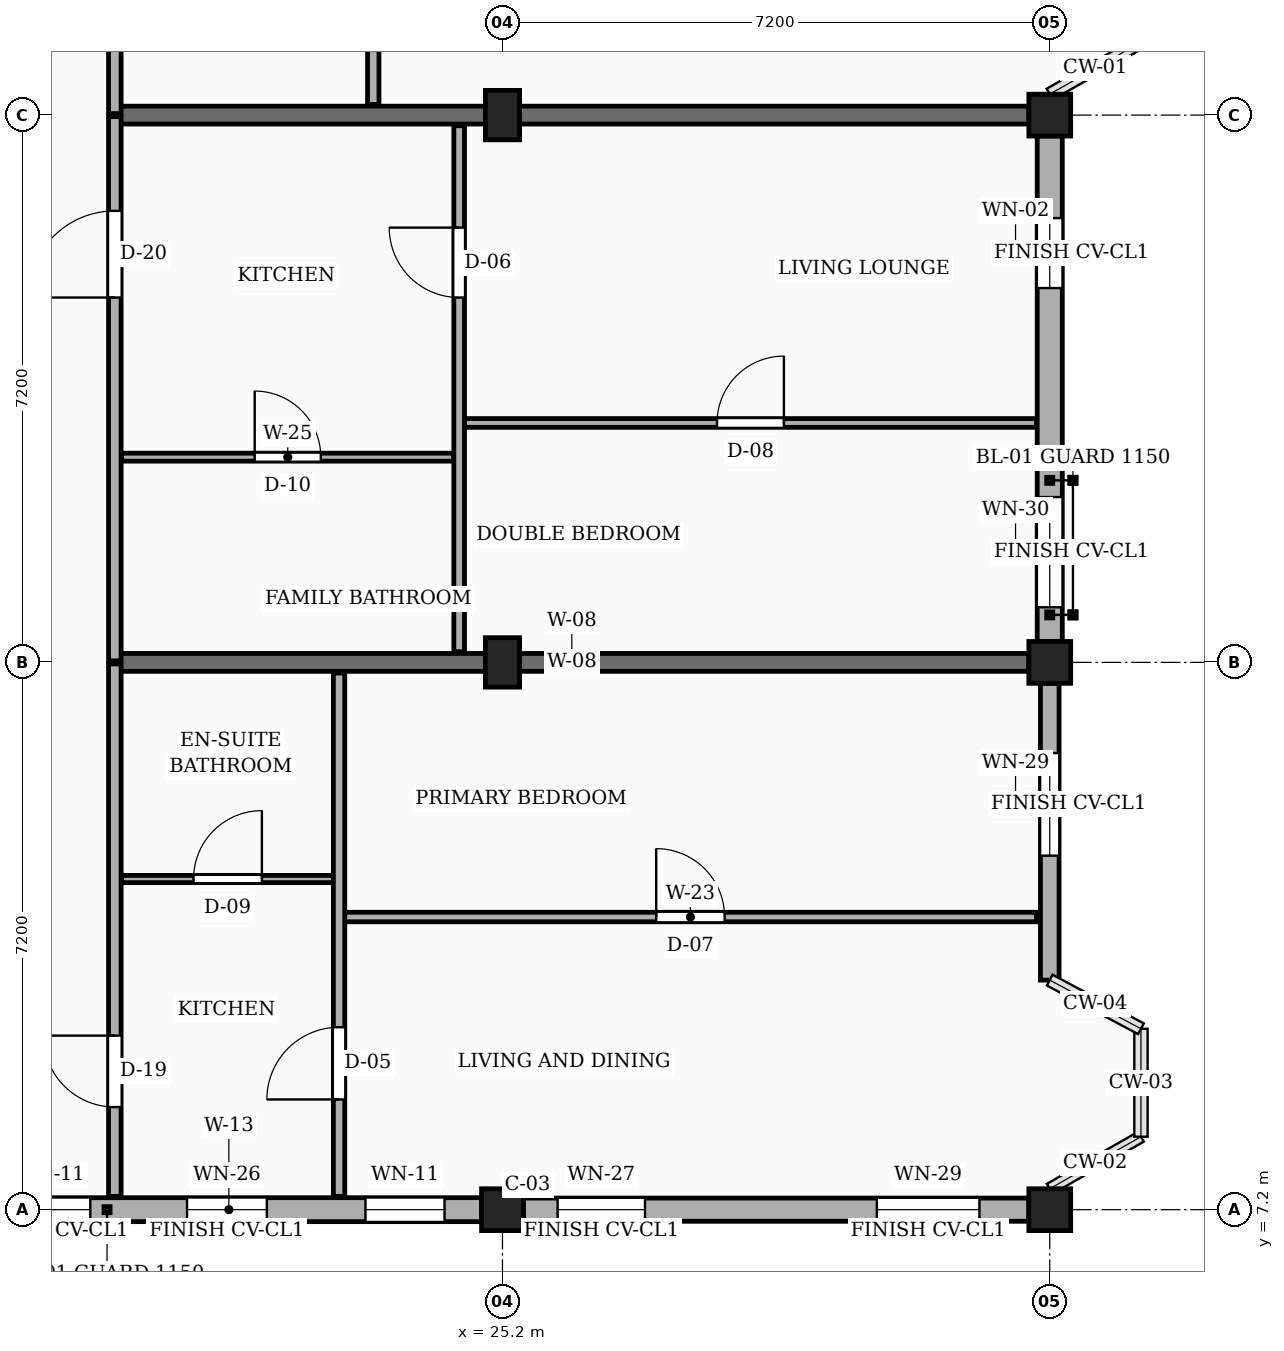
"""IFC4 building model, lengths in metres.
Left out: names, types, materials, properties, quantities, classifications, styles, units other than length and angle.
Written with IfcOpenShell. Run it as: python <this file> out.ifc"""

import sys

from ifc_helpers import new_model, si_unit, direction, frame, frame_2d, origin, origin_2d, place, context, subcontext, project, spatial, rectangle, extrude, element, fill, save


model = new_model("IFC4")
c1 = context("Model", 3, precision=1e-05, world=origin(), true_north=direction((0.0, 1.0)))
c2 = subcontext(c1, "Body", "Model", "MODEL_VIEW")
j1 = project(units=[si_unit("LENGTHUNIT", "METRE"), si_unit("PLANEANGLEUNIT", "RADIAN")], contexts=[c1])
p1 = place(None, origin())
s1 = spatial("IfcSite", under=j1, at=p1, CompositionType="ELEMENT")
p2 = place(p1, origin())
s2 = spatial("IfcBuilding", under=s1, at=p2, CompositionType="ELEMENT")
p3 = place(p2, frame((0.0, 0.0, 20.25)))
s3 = spatial("IfcBuildingStorey", under=s2, at=p3, CompositionType="ELEMENT", Elevation=20.25)
p4 = place(p3, frame((25.2, 7.2, 0.0), z_axis=(0.0, 0.0, 1.0), x_axis=(1.0, 0.0, 0.0)))
e1 = element("IfcColumn", 1, at=p4, inside=s3, PredefinedType="COLUMN", context=c2, shape_type="SweptSolid", body=[
    extrude(rectangle(XDim=0.55, YDim=0.55, at=origin_2d()), origin(), (0.0, 0.0, 1.0), 3.15),
])
for number, where, z_axis, x_axis in (
    (2, (25.2, 14.4, 0.0), (0.0, 0.0, 1.0), (1.0, 0.0, 0.0)),
    (3, (25.2, 21.6, 0.0), (0.0, 0.0, 1.0), (1.0, 0.0, 0.0)),
):
    element("IfcColumn", number, at=place(p3, frame(where, z_axis=z_axis, x_axis=x_axis)), inside=s3, PredefinedType="COLUMN", context=c2, shape_type="SweptSolid", body=[
        extrude(rectangle(XDim=0.45, YDim=0.65, at=origin_2d()), origin(), (0.0, 0.0, 1.0), 3.15),
    ])
for number, where, z_axis, x_axis in (
    (4, (32.4, 7.2, 0.0), (0.0, 0.0, 1.0), (1.0, 0.0, 0.0)),
    (5, (32.4, 14.4, 0.0), (0.0, 0.0, 1.0), (1.0, 0.0, 0.0)),
    (6, (32.4, 21.6, 0.0), (0.0, 0.0, 1.0), (1.0, 0.0, 0.0)),
):
    element("IfcColumn", number, at=place(p3, frame(where, z_axis=z_axis, x_axis=x_axis)), inside=s3, PredefinedType="COLUMN", context=c2, shape_type="SweptSolid", body=[
        extrude(rectangle(XDim=0.55, YDim=0.55, at=origin_2d()), origin(), (0.0, 0.0, 1.0), 3.15),
    ])
for number, where, z_axis, x_axis in (
    (7, (20.1, 14.4, 0.0), (0.0, 0.0, 1.0), (1.0, 0.0, 0.0)),
    (8, (20.1, 21.6, 0.0), (0.0, 0.0, 1.0), (1.0, 0.0, 0.0)),
):
    element("IfcWall", number, at=place(p3, frame(where, z_axis=z_axis, x_axis=x_axis)), inside=s3, PredefinedType="SOLIDWALL", context=c2, shape_type="SweptSolid", body=[
        extrude(rectangle(XDim=12.025, YDim=0.235, at=frame_2d((6.012, 0.0))), origin(), (0.0, 0.0, 1.0), 2.17),
    ])
p5 = place(p3, frame((18.275, 7.2, 0.0), z_axis=(0.0, 0.0, 1.0), x_axis=(1.0, 0.0, 0.0)))
e9 = element("IfcWall", 9, at=p5, inside=s3, PredefinedType="SOLIDWALL", context=c2, shape_type="SweptSolid", body=[
    extrude(rectangle(XDim=6.65, YDim=0.315, at=frame_2d((3.325, 0.0))), origin(), (0.0, 0.0, 1.0), 2.44),
])
p6 = place(p5, frame((0.462, 0.0, 0.78)))
e10 = element("IfcOpeningElement", 10, at=p6, cuts=e9, PredefinedType="OPENING", context=c2, shape_type="SweptSolid", body=[
    extrude(rectangle(XDim=1.04, YDim=1.26, at=frame_2d((0.52, 0.63))), frame((0.0, 0.167, 0.0), z_axis=(0.0, -1.0, 0.0), x_axis=(1.0, 0.0, 0.0)), (0.0, 0.0, 1.0), 0.335),
])
p7 = place(p5, frame((2.775, 0.0, 0.78)))
e11 = element("IfcOpeningElement", 11, at=p7, cuts=e9, PredefinedType="OPENING", context=c2, shape_type="SweptSolid", body=[
    extrude(rectangle(XDim=1.05, YDim=1.44, at=frame_2d((0.525, 0.72))), frame((0.0, 0.167, 0.0), z_axis=(0.0, -1.0, 0.0), x_axis=(1.0, 0.0, 0.0)), (0.0, 0.0, 1.0), 0.335),
])
p8 = place(p5, frame((5.123, 0.0, 0.78)))
e12 = element("IfcOpeningElement", 12, at=p8, cuts=e9, PredefinedType="OPENING", context=c2, shape_type="SweptSolid", body=[
    extrude(rectangle(XDim=1.04, YDim=1.26, at=frame_2d((0.52, 0.63))), frame((0.0, 0.167, 0.0), z_axis=(0.0, -1.0, 0.0), x_axis=(1.0, 0.0, 0.0)), (0.0, 0.0, 1.0), 0.335),
])
p9 = place(p3, frame((25.475, 7.2, 0.0), z_axis=(0.0, 0.0, 1.0), x_axis=(1.0, 0.0, 0.0)))
e13 = element("IfcWall", 13, at=p9, inside=s3, PredefinedType="SOLIDWALL", context=c2, shape_type="SweptSolid", body=[
    extrude(rectangle(XDim=6.65, YDim=0.305, at=frame_2d((3.325, 0.0))), origin(), (0.0, 0.0, 1.0), 2.44),
])
p10 = place(p9, frame((0.45, 0.0, 0.78)))
e14 = element("IfcOpeningElement", 14, at=p10, cuts=e13, PredefinedType="OPENING", context=c2, shape_type="SweptSolid", body=[
    extrude(rectangle(XDim=1.15, YDim=1.44, at=frame_2d((0.575, 0.72))), frame((0.0, 0.163, 0.0), z_axis=(0.0, -1.0, 0.0), x_axis=(1.0, 0.0, 0.0)), (0.0, 0.0, 1.0), 0.325),
])
p11 = place(p9, frame((4.65, 0.0, 0.78)))
e15 = element("IfcOpeningElement", 15, at=p11, cuts=e13, PredefinedType="OPENING", context=c2, shape_type="SweptSolid", body=[
    extrude(rectangle(XDim=1.35, YDim=1.44, at=frame_2d((0.675, 0.72))), frame((0.0, 0.163, 0.0), z_axis=(0.0, -1.0, 0.0), x_axis=(1.0, 0.0, 0.0)), (0.0, 0.0, 1.0), 0.325),
])
p12 = place(p3, frame((32.4, 10.22, 0.0), z_axis=(0.0, 0.0, 1.0), x_axis=(0.0, 1.0, 0.0)))
e16 = element("IfcWall", 16, at=p12, inside=s3, PredefinedType="SOLIDWALL", context=c2, shape_type="SweptSolid", body=[
    extrude(rectangle(XDim=3.905, YDim=0.245, at=frame_2d((1.953, 0.0))), origin(), (0.0, 0.0, 1.0), 2.44),
])
p13 = place(p12, frame((1.637, 0.0, 0.78)))
e17 = element("IfcOpeningElement", 17, at=p13, cuts=e16, PredefinedType="OPENING", context=c2, shape_type="SweptSolid", body=[
    extrude(rectangle(XDim=1.35, YDim=1.44, at=frame_2d((0.675, 0.72))), frame((0.0, 0.133, 0.0), z_axis=(0.0, -1.0, 0.0), x_axis=(1.0, 0.0, 0.0)), (0.0, 0.0, 1.0), 0.265),
])
p14 = place(p3, frame((32.4, 14.675, 0.0), z_axis=(0.0, 0.0, 1.0), x_axis=(0.0, 1.0, 0.0)))
e18 = element("IfcWall", 18, at=p14, inside=s3, PredefinedType="SOLIDWALL", context=c2, shape_type="SweptSolid", body=[
    extrude(rectangle(XDim=6.65, YDim=0.33, at=frame_2d((3.325, 0.0))), origin(), (0.0, 0.0, 1.0), 2.44),
])
p15 = place(p14, frame((0.45, 0.0, 0.78)))
e19 = element("IfcOpeningElement", 19, at=p15, cuts=e18, PredefinedType="OPENING", context=c2, shape_type="SweptSolid", body=[
    extrude(rectangle(XDim=1.45, YDim=1.44, at=frame_2d((0.725, 0.72))), frame((0.0, 0.175, 0.0), z_axis=(0.0, -1.0, 0.0), x_axis=(1.0, 0.0, 0.0)), (0.0, 0.0, 1.0), 0.35),
])
p16 = place(p14, frame((4.65, 0.0, 0.78)))
e20 = element("IfcOpeningElement", 20, at=p16, cuts=e18, PredefinedType="OPENING", context=c2, shape_type="SweptSolid", body=[
    extrude(rectangle(XDim=0.92, YDim=1.15, at=frame_2d((0.46, 0.575))), frame((0.0, 0.175, 0.0), z_axis=(0.0, -1.0, 0.0), x_axis=(1.0, 0.0, 0.0)), (0.0, 0.0, 1.0), 0.35),
])
p17 = place(p3, frame((20.1, 7.375, 0.0), z_axis=(0.0, 0.0, 1.0), x_axis=(0.0, 1.0, 0.0)))
e21 = element("IfcWall", 21, at=p17, inside=s3, PredefinedType="PARTITIONING", context=c2, shape_type="SweptSolid", body=[
    extrude(rectangle(XDim=7.005, YDim=0.165, at=frame_2d((3.502, 0.0))), origin(), (0.0, 0.0, 1.0), 2.305),
])
p18 = place(p17, frame((1.175, 0.0, 0.0)))
e22 = element("IfcOpeningElement", 22, at=p18, cuts=e21, PredefinedType="OPENING", context=c2, shape_type="SweptSolid", body=[
    extrude(rectangle(XDim=0.94, YDim=2.12, at=frame_2d((0.47, 1.06))), frame((0.0, 0.093, 0.0), z_axis=(0.0, -1.0, 0.0), x_axis=(1.0, 0.0, 0.0)), (0.0, 0.0, 1.0), 0.185),
])
p19 = place(p3, frame((20.1, 14.42, 0.0), z_axis=(0.0, 0.0, 1.0), x_axis=(0.0, 1.0, 0.0)))
e23 = element("IfcWall", 23, at=p19, inside=s3, PredefinedType="PARTITIONING", context=c2, shape_type="SweptSolid", body=[
    extrude(rectangle(XDim=7.16, YDim=0.165, at=frame_2d((3.58, 0.0))), origin(), (0.0, 0.0, 1.0), 2.305),
])
p20 = place(p19, frame((4.78, 0.0, 0.0)))
e24 = element("IfcOpeningElement", 24, at=p20, cuts=e23, PredefinedType="OPENING", context=c2, shape_type="SweptSolid", body=[
    extrude(rectangle(XDim=1.14, YDim=2.18, at=frame_2d((0.57, 1.09))), frame((0.0, 0.093, 0.0), z_axis=(0.0, -1.0, 0.0), x_axis=(1.0, 0.0, 0.0)), (0.0, 0.0, 1.0), 0.185),
])
p21 = place(p3, frame((20.1, 21.62, 0.0), z_axis=(0.0, 0.0, 1.0), x_axis=(0.0, 1.0, 0.0)))
e25 = element("IfcWall", 25, at=p21, inside=s3, PredefinedType="PARTITIONING", context=c2, shape_type="SweptSolid", body=[
    extrude(rectangle(XDim=7.16, YDim=0.165, at=frame_2d((3.58, 0.0))), origin(), (0.0, 0.0, 1.0), 2.305),
])
p22 = place(p21, frame((1.33, 0.0, 0.0)))
e26 = element("IfcOpeningElement", 26, at=p22, cuts=e25, PredefinedType="OPENING", context=c2, shape_type="SweptSolid", body=[
    extrude(rectangle(XDim=1.0, YDim=2.15, at=frame_2d((0.5, 1.075))), frame((0.0, 0.093, 0.0), z_axis=(0.0, -1.0, 0.0), x_axis=(1.0, 0.0, 0.0)), (0.0, 0.0, 1.0), 0.185),
])
p23 = place(p3, frame((23.12, 11.05, 0.0), z_axis=(0.0, 0.0, 1.0), x_axis=(1.0, 0.0, 0.0)))
e27 = element("IfcWall", 27, at=p23, inside=s3, PredefinedType="PARTITIONING", context=c2, shape_type="SweptSolid", body=[
    extrude(rectangle(XDim=9.105, YDim=0.125, at=frame_2d((4.552, 0.0))), origin(), (0.0, 0.0, 1.0), 2.305),
])
p24 = place(p23, frame((4.103, 0.0, 0.0)))
e28 = element("IfcOpeningElement", 28, at=p24, cuts=e27, PredefinedType="OPENING", context=c2, shape_type="SweptSolid", body=[
    extrude(rectangle(XDim=0.9, YDim=2.1, at=frame_2d((0.45, 1.05))), frame((0.0, 0.073, 0.0), z_axis=(0.0, -1.0, 0.0), x_axis=(1.0, 0.0, 0.0)), (0.0, 0.0, 1.0), 0.145),
])
p25 = place(p3, frame((20.19, 11.55, 0.0), z_axis=(0.0, 0.0, 1.0), x_axis=(1.0, 0.0, 0.0)))
e29 = element("IfcWall", 29, at=p25, inside=s3, PredefinedType="PARTITIONING", context=c2, shape_type="SweptSolid", body=[
    extrude(rectangle(XDim=2.79, YDim=0.095, at=frame_2d((1.395, 0.0))), origin(), (0.0, 0.0, 1.0), 2.305),
])
p26 = place(p25, frame((0.945, 0.0, 0.0)))
e30 = element("IfcOpeningElement", 30, at=p26, cuts=e29, PredefinedType="OPENING", context=c2, shape_type="SweptSolid", body=[
    extrude(rectangle(XDim=0.9, YDim=2.05, at=frame_2d((0.45, 1.025))), frame((0.0, 0.058, 0.0), z_axis=(0.0, -1.0, 0.0), x_axis=(1.0, 0.0, 0.0)), (0.0, 0.0, 1.0), 0.115),
])
p27 = place(p3, frame((23.05, 7.375, 0.0), z_axis=(0.0, 0.0, 1.0), x_axis=(0.0, 1.0, 0.0)))
e31 = element("IfcWall", 31, at=p27, inside=s3, PredefinedType="PARTITIONING", context=c2, shape_type="SweptSolid", body=[
    extrude(rectangle(XDim=6.885, YDim=0.15, at=frame_2d((3.442, 0.0))), origin(), (0.0, 0.0, 1.0), 2.305),
])
p28 = place(p27, frame((1.275, 0.0, 0.0)))
e32 = element("IfcOpeningElement", 32, at=p28, cuts=e31, PredefinedType="OPENING", context=c2, shape_type="SweptSolid", body=[
    extrude(rectangle(XDim=0.95, YDim=2.1, at=frame_2d((0.475, 1.05))), frame((0.0, 0.085, 0.0), z_axis=(0.0, -1.0, 0.0), x_axis=(1.0, 0.0, 0.0)), (0.0, 0.0, 1.0), 0.17),
])
p29 = place(p3, frame((24.7, 17.55, 0.0), z_axis=(0.0, 0.0, 1.0), x_axis=(1.0, 0.0, 0.0)))
e33 = element("IfcWall", 33, at=p29, inside=s3, PredefinedType="PARTITIONING", context=c2, shape_type="SweptSolid", body=[
    extrude(rectangle(XDim=7.525, YDim=0.115, at=frame_2d((3.763, 0.0))), origin(), (0.0, 0.0, 1.0), 2.305),
])
p30 = place(p29, frame((3.323, 0.0, 0.0)))
e34 = element("IfcOpeningElement", 34, at=p30, cuts=e33, PredefinedType="OPENING", context=c2, shape_type="SweptSolid", body=[
    extrude(rectangle(XDim=0.88, YDim=2.08, at=frame_2d((0.44, 1.04))), frame((0.0, 0.067, 0.0), z_axis=(0.0, -1.0, 0.0), x_axis=(1.0, 0.0, 0.0)), (0.0, 0.0, 1.0), 0.135),
])
p31 = place(p3, frame((20.19, 17.1, 0.0), z_axis=(0.0, 0.0, 1.0), x_axis=(1.0, 0.0, 0.0)))
e35 = element("IfcWall", 35, at=p31, inside=s3, PredefinedType="PARTITIONING", context=c2, shape_type="SweptSolid", body=[
    extrude(rectangle(XDim=4.37, YDim=0.105, at=frame_2d((2.185, 0.0))), origin(), (0.0, 0.0, 1.0), 2.305),
])
p32 = place(p31, frame((1.75, 0.0, 0.0)))
e36 = element("IfcOpeningElement", 36, at=p32, cuts=e35, PredefinedType="OPENING", context=c2, shape_type="SweptSolid", body=[
    extrude(rectangle(XDim=0.87, YDim=2.05, at=frame_2d((0.435, 1.025))), frame((0.0, 0.062, 0.0), z_axis=(0.0, -1.0, 0.0), x_axis=(1.0, 0.0, 0.0)), (0.0, 0.0, 1.0), 0.125),
])
p33 = place(p3, frame((24.63, 14.54, 0.0), z_axis=(0.0, 0.0, 1.0), x_axis=(0.0, 1.0, 0.0)))
e37 = element("IfcWall", 37, at=p33, inside=s3, PredefinedType="PARTITIONING", context=c2, shape_type="SweptSolid", body=[
    extrude(rectangle(XDim=6.92, YDim=0.14, at=frame_2d((3.46, 0.0))), origin(), (0.0, 0.0, 1.0), 2.305),
])
p34 = place(p33, frame((4.66, 0.0, 0.0)))
e38 = element("IfcOpeningElement", 38, at=p34, cuts=e37, PredefinedType="OPENING", context=c2, shape_type="SweptSolid", body=[
    extrude(rectangle(XDim=0.92, YDim=2.1, at=frame_2d((0.46, 1.05))), frame((0.0, 0.08, 0.0), z_axis=(0.0, -1.0, 0.0), x_axis=(1.0, 0.0, 0.0)), (0.0, 0.0, 1.0), 0.16),
])
p35 = place(p3, frame((23.5, 21.74, 0.0), z_axis=(0.0, 0.0, 1.0), x_axis=(0.0, 1.0, 0.0)))
e39 = element("IfcWall", 39, at=p35, inside=s3, PredefinedType="PARTITIONING", context=c2, shape_type="SweptSolid", body=[
    extrude(rectangle(XDim=6.92, YDim=0.15, at=frame_2d((3.46, 0.0))), origin(), (0.0, 0.0, 1.0), 2.305),
])
p36 = place(p35, frame((1.31, 0.0, 0.0)))
e40 = element("IfcOpeningElement", 40, at=p36, cuts=e39, PredefinedType="OPENING", context=c2, shape_type="SweptSolid", body=[
    extrude(rectangle(XDim=0.95, YDim=2.1, at=frame_2d((0.475, 1.05))), frame((0.0, 0.085, 0.0), z_axis=(0.0, -1.0, 0.0), x_axis=(1.0, 0.0, 0.0)), (0.0, 0.0, 1.0), 0.17),
])
p37 = place(p6, origin())
e41 = element("IfcWindow", 41, at=p37, inside=s3, PartitioningType="SINGLE_PANEL", PredefinedType="WINDOW", context=c2, shape_type="SweptSolid", body=[
    extrude(rectangle(XDim=1.04, YDim=1.26, at=frame_2d((0.52, 0.63))), frame((0.0, 0.03, 0.0), z_axis=(0.0, -1.0, 0.0), x_axis=(1.0, 0.0, 0.0)), (0.0, 0.0, 1.0), 0.06),
])
fill(e10, e41)
p38 = place(p7, origin())
e42 = element("IfcWindow", 42, at=p38, inside=s3, PartitioningType="SINGLE_PANEL", PredefinedType="WINDOW", context=c2, shape_type="SweptSolid", body=[
    extrude(rectangle(XDim=1.05, YDim=1.44, at=frame_2d((0.525, 0.72))), frame((0.0, 0.03, 0.0), z_axis=(0.0, -1.0, 0.0), x_axis=(1.0, 0.0, 0.0)), (0.0, 0.0, 1.0), 0.06),
])
fill(e11, e42)
p39 = place(p8, origin())
e43 = element("IfcWindow", 43, at=p39, inside=s3, PartitioningType="SINGLE_PANEL", PredefinedType="WINDOW", context=c2, shape_type="SweptSolid", body=[
    extrude(rectangle(XDim=1.04, YDim=1.26, at=frame_2d((0.52, 0.63))), frame((0.0, 0.03, 0.0), z_axis=(0.0, -1.0, 0.0), x_axis=(1.0, 0.0, 0.0)), (0.0, 0.0, 1.0), 0.06),
])
fill(e12, e43)
p40 = place(p10, origin())
e44 = element("IfcWindow", 44, at=p40, inside=s3, PartitioningType="SINGLE_PANEL", PredefinedType="WINDOW", context=c2, shape_type="SweptSolid", body=[
    extrude(rectangle(XDim=1.15, YDim=1.44, at=frame_2d((0.575, 0.72))), frame((0.0, 0.03, 0.0), z_axis=(0.0, -1.0, 0.0), x_axis=(1.0, 0.0, 0.0)), (0.0, 0.0, 1.0), 0.06),
])
fill(e14, e44)
p41 = place(p11, origin())
e45 = element("IfcWindow", 45, at=p41, inside=s3, PartitioningType="SINGLE_PANEL", PredefinedType="WINDOW", context=c2, shape_type="SweptSolid", body=[
    extrude(rectangle(XDim=1.35, YDim=1.44, at=frame_2d((0.675, 0.72))), frame((0.0, 0.03, 0.0), z_axis=(0.0, -1.0, 0.0), x_axis=(1.0, 0.0, 0.0)), (0.0, 0.0, 1.0), 0.06),
])
fill(e15, e45)
p42 = place(p13, origin())
e46 = element("IfcWindow", 46, at=p42, inside=s3, PartitioningType="SINGLE_PANEL", PredefinedType="WINDOW", context=c2, shape_type="SweptSolid", body=[
    extrude(rectangle(XDim=1.35, YDim=1.44, at=frame_2d((0.675, 0.72))), frame((0.0, 0.03, 0.0), z_axis=(0.0, -1.0, 0.0), x_axis=(1.0, 0.0, 0.0)), (0.0, 0.0, 1.0), 0.06),
])
fill(e17, e46)
p43 = place(p15, origin())
e47 = element("IfcWindow", 47, at=p43, inside=s3, PartitioningType="SINGLE_PANEL", PredefinedType="WINDOW", context=c2, shape_type="SweptSolid", body=[
    extrude(rectangle(XDim=1.45, YDim=1.44, at=frame_2d((0.725, 0.72))), frame((0.0, 0.03, 0.0), z_axis=(0.0, -1.0, 0.0), x_axis=(1.0, 0.0, 0.0)), (0.0, 0.0, 1.0), 0.06),
])
fill(e19, e47)
p44 = place(p16, origin())
e48 = element("IfcWindow", 48, at=p44, inside=s3, PartitioningType="SINGLE_PANEL", PredefinedType="WINDOW", context=c2, shape_type="SweptSolid", body=[
    extrude(rectangle(XDim=0.92, YDim=1.15, at=frame_2d((0.46, 0.575))), frame((0.0, 0.03, 0.0), z_axis=(0.0, -1.0, 0.0), x_axis=(1.0, 0.0, 0.0)), (0.0, 0.0, 1.0), 0.06),
])
fill(e20, e48)
p45 = place(p18, origin())
e49 = element("IfcDoor", 49, at=p45, inside=s3, OperationType="SINGLE_SWING_RIGHT", PredefinedType="DOOR", context=c2, shape_type="SweptSolid", body=[
    extrude(rectangle(XDim=0.94, YDim=2.12, at=frame_2d((0.47, 1.06))), frame((0.0, 0.025, 0.0), z_axis=(0.0, -1.0, 0.0), x_axis=(1.0, 0.0, 0.0)), (0.0, 0.0, 1.0), 0.05),
])
fill(e22, e49)
p46 = place(p20, origin())
e50 = element("IfcDoor", 50, at=p46, inside=s3, OperationType="SINGLE_SWING_LEFT", PredefinedType="DOOR", context=c2, shape_type="SweptSolid", body=[
    extrude(rectangle(XDim=1.14, YDim=2.18, at=frame_2d((0.57, 1.09))), frame((0.0, 0.025, 0.0), z_axis=(0.0, -1.0, 0.0), x_axis=(1.0, 0.0, 0.0)), (0.0, 0.0, 1.0), 0.05),
])
fill(e24, e50)
p47 = place(p24, origin())
e51 = element("IfcDoor", 51, at=p47, inside=s3, OperationType="SINGLE_SWING_LEFT", PredefinedType="DOOR", context=c2, shape_type="SweptSolid", body=[
    extrude(rectangle(XDim=0.9, YDim=2.1, at=frame_2d((0.45, 1.05))), frame((0.0, 0.025, 0.0), z_axis=(0.0, -1.0, 0.0), x_axis=(1.0, 0.0, 0.0)), (0.0, 0.0, 1.0), 0.05),
])
fill(e28, e51)
p48 = place(p26, origin())
e52 = element("IfcDoor", 52, at=p48, inside=s3, OperationType="SINGLE_SWING_RIGHT", PredefinedType="DOOR", context=c2, shape_type="SweptSolid", body=[
    extrude(rectangle(XDim=0.9, YDim=2.05, at=frame_2d((0.45, 1.025))), frame((0.0, 0.025, 0.0), z_axis=(0.0, -1.0, 0.0), x_axis=(1.0, 0.0, 0.0)), (0.0, 0.0, 1.0), 0.05),
])
fill(e30, e52)
p49 = place(p28, origin())
e53 = element("IfcDoor", 53, at=p49, inside=s3, OperationType="SINGLE_SWING_LEFT", PredefinedType="DOOR", context=c2, shape_type="SweptSolid", body=[
    extrude(rectangle(XDim=0.95, YDim=2.1, at=frame_2d((0.475, 1.05))), frame((0.0, 0.025, 0.0), z_axis=(0.0, -1.0, 0.0), x_axis=(1.0, 0.0, 0.0)), (0.0, 0.0, 1.0), 0.05),
])
fill(e32, e53)
p50 = place(p30, origin())
e54 = element("IfcDoor", 54, at=p50, inside=s3, OperationType="SINGLE_SWING_RIGHT", PredefinedType="DOOR", context=c2, shape_type="SweptSolid", body=[
    extrude(rectangle(XDim=0.88, YDim=2.08, at=frame_2d((0.44, 1.04))), frame((0.0, 0.025, 0.0), z_axis=(0.0, -1.0, 0.0), x_axis=(1.0, 0.0, 0.0)), (0.0, 0.0, 1.0), 0.05),
])
fill(e34, e54)
p51 = place(p32, origin())
e55 = element("IfcDoor", 55, at=p51, inside=s3, OperationType="SINGLE_SWING_LEFT", PredefinedType="DOOR", context=c2, shape_type="SweptSolid", body=[
    extrude(rectangle(XDim=0.87, YDim=2.05, at=frame_2d((0.435, 1.025))), frame((0.0, 0.025, 0.0), z_axis=(0.0, -1.0, 0.0), x_axis=(1.0, 0.0, 0.0)), (0.0, 0.0, 1.0), 0.05),
])
fill(e36, e55)
p52 = place(p34, origin())
e56 = element("IfcDoor", 56, at=p52, inside=s3, OperationType="SINGLE_SWING_RIGHT", PredefinedType="DOOR", context=c2, shape_type="SweptSolid", body=[
    extrude(rectangle(XDim=0.92, YDim=2.1, at=frame_2d((0.46, 1.05))), frame((0.0, 0.025, 0.0), z_axis=(0.0, -1.0, 0.0), x_axis=(1.0, 0.0, 0.0)), (0.0, 0.0, 1.0), 0.05),
])
fill(e38, e56)
save(model, sys.argv[1])
